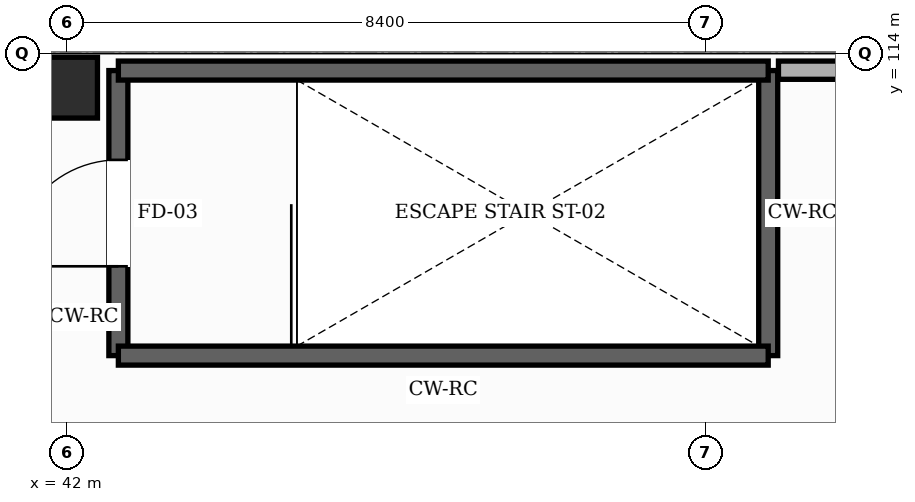
"""IFC4 building model, lengths in metres.
Left out: names, types, materials, properties, quantities, classifications, styles, units other than length and angle.
Written with IfcOpenShell. Run it as: python <this file> out.ifc"""

import sys

from ifc_helpers import new_model, si_unit, direction, frame, frame_2d, origin, origin_2d, place, context, subcontext, project, spatial, rectangle, hollow_rectangle, extrude, element, fill, save


model = new_model("IFC4")
c1 = context("Model", 3, precision=1e-05, world=origin(), true_north=direction((0.0, 1.0)))
c2 = subcontext(c1, "Body", "Model", "MODEL_VIEW")
j1 = project(units=[si_unit("LENGTHUNIT", "METRE"), si_unit("PLANEANGLEUNIT", "RADIAN")], contexts=[c1])
p1 = place(None, origin())
s1 = spatial("IfcSite", under=j1, at=p1, CompositionType="ELEMENT")
p2 = place(p1, origin())
s2 = spatial("IfcBuilding", under=s1, at=p2, CompositionType="ELEMENT")
p3 = place(p2, frame((0.0, 0.0, 15.0)))
s3 = spatial("IfcBuildingStorey", under=s2, at=p3, CompositionType="ELEMENT", Elevation=15.0)
p4 = place(p3, frame((42.0, 113.55, 0.0), z_axis=(0.0, 0.0, 1.0), x_axis=(1.0, 0.0, 0.0)))
e1 = element("IfcColumn", 1, at=p4, inside=s3, PredefinedType="COLUMN", context=c2, shape_type="SweptSolid", body=[
    extrude(hollow_rectangle(XDim=0.8, YDim=0.8, WallThickness=0.032, InnerFilletRadius=0.032, OuterFilletRadius=0.064, at=origin_2d()), origin(), (0.0, 0.0, 1.0), 4.8),
])
p5 = place(p3, frame((51.36, 113.78, 0.0), z_axis=(0.0, 0.0, 1.0), x_axis=(1.0, 0.0, 0.0)))
e2 = element("IfcWall", 2, at=p5, inside=s3, PredefinedType="SOLIDWALL", context=c2, shape_type="SweptSolid", body=[
    extrude(rectangle(XDim=6.59, YDim=0.24, at=frame_2d((3.295, 0.0))), origin(), (0.0, 0.0, 1.0), 4.545),
])
p6 = place(p3, frame((42.675, 110.025, 0.0), z_axis=(0.0, 0.0, 1.0), x_axis=(0.0, 1.0, 0.0)))
e3 = element("IfcWall", 3, at=p6, inside=s3, PredefinedType="SHEAR", context=c2, shape_type="SweptSolid", body=[
    extrude(rectangle(XDim=3.75, YDim=0.25, at=frame_2d((1.875, 0.0))), origin(), (0.0, 0.0, 1.0), 4.56),
])
p7 = place(p6, frame((1.175, 0.0, 0.0)))
e4 = element("IfcOpeningElement", 4, at=p7, cuts=e3, PredefinedType="OPENING", context=c2, shape_type="SweptSolid", body=[
    extrude(rectangle(XDim=1.4, YDim=2.25, at=frame_2d((0.7, 1.125))), frame((0.0, 0.135, 0.0), z_axis=(0.0, -1.0, 0.0), x_axis=(1.0, 0.0, 0.0)), (0.0, 0.0, 1.0), 0.27),
])
p8 = place(p3, frame((51.225, 113.775, 0.0), z_axis=(0.0, 0.0, 1.0), x_axis=(0.0, -1.0, 0.0)))
e5 = element("IfcWall", 5, at=p8, inside=s3, PredefinedType="SHEAR", context=c2, shape_type="SweptSolid", body=[
    extrude(rectangle(XDim=3.75, YDim=0.25, at=frame_2d((1.875, 0.0))), origin(), (0.0, 0.0, 1.0), 4.56),
])
for number, where, z_axis, x_axis in (
    (6, (51.225, 110.025, 0.0), (0.0, 0.0, 1.0), (-1.0, 0.0, 0.0)),
    (7, (42.675, 113.775, 0.0), (0.0, 0.0, 1.0), (1.0, 0.0, 0.0)),
):
    element("IfcWall", number, at=place(p3, frame(where, z_axis=z_axis, x_axis=x_axis)), inside=s3, PredefinedType="SHEAR", context=c2, shape_type="SweptSolid", body=[
        extrude(rectangle(XDim=8.55, YDim=0.25, at=frame_2d((4.275, 0.0))), origin(), (0.0, 0.0, 1.0), 4.56),
    ])
p9 = place(p7, origin())
e8 = element("IfcDoor", 8, at=p9, inside=s3, OperationType="SINGLE_SWING_LEFT", PredefinedType="DOOR", context=c2, shape_type="SweptSolid", body=[
    extrude(rectangle(XDim=1.4, YDim=2.25, at=frame_2d((0.7, 1.125))), frame((0.0, 0.025, 0.0), z_axis=(0.0, -1.0, 0.0), x_axis=(1.0, 0.0, 0.0)), (0.0, 0.0, 1.0), 0.05),
])
fill(e4, e8)
save(model, sys.argv[1])
